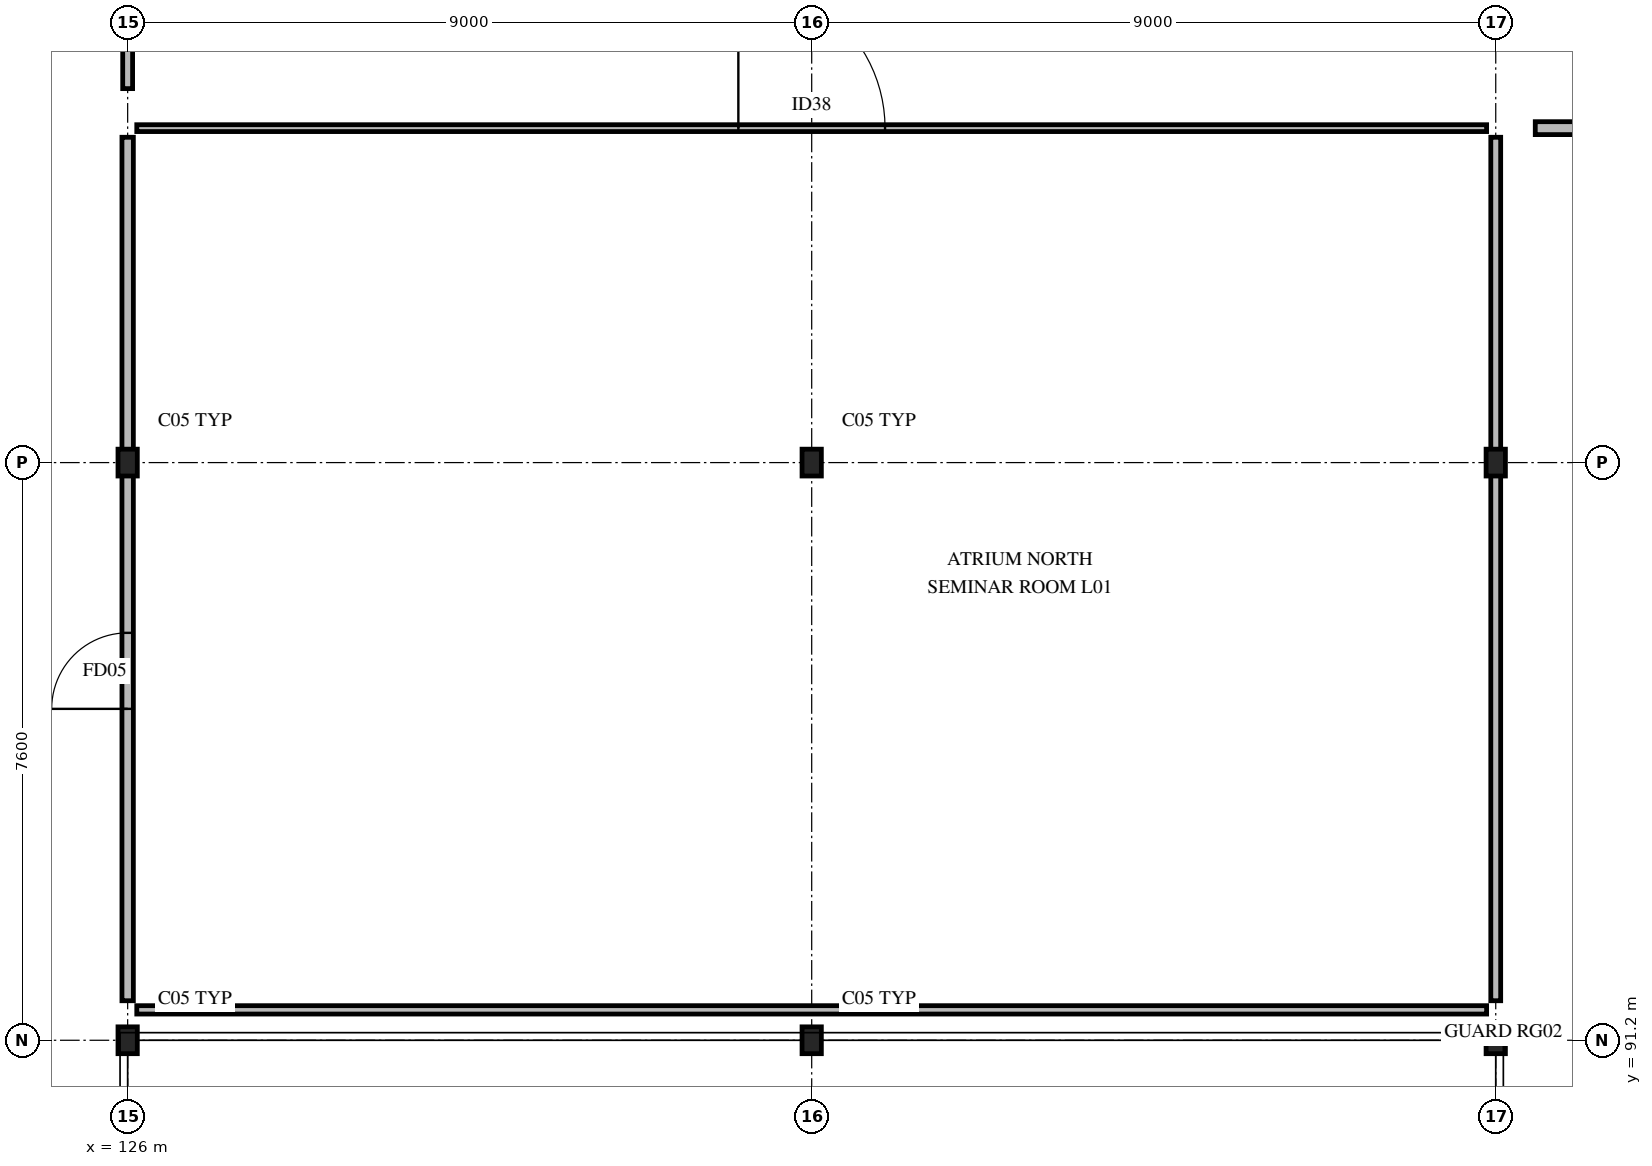
"""IFC4 building model, lengths in metres.
Left out: names, types, materials, properties, quantities, classifications, styles, units other than length and angle.
Written with IfcOpenShell. Run it as: python <this file> out.ifc"""

import sys

from ifc_helpers import new_model, si_unit, direction, frame, frame_2d, origin, origin_2d, place, context, subcontext, project, spatial, rectangle, i_section, extrude, element, fill, save


model = new_model("IFC4")
c1 = context("Model", 3, precision=1e-05, world=origin(), true_north=direction((0.0, 1.0)))
c2 = subcontext(c1, "Body", "Model", "MODEL_VIEW")
j1 = project(units=[si_unit("LENGTHUNIT", "METRE"), si_unit("PLANEANGLEUNIT", "RADIAN")], contexts=[c1])
p1 = place(None, origin())
s1 = spatial("IfcSite", under=j1, at=p1, CompositionType="ELEMENT")
p2 = place(p1, origin())
s2 = spatial("IfcBuilding", under=s1, at=p2, CompositionType="ELEMENT")
p3 = place(p2, frame((0.0, 0.0, 5.04)))
s3 = spatial("IfcBuildingStorey", under=s2, at=p3, CompositionType="ELEMENT", Elevation=5.04)
for number, where, z_axis, x_axis in (
    (1, (126.0, 91.2, 0.0), (0.0, 0.0, 1.0), (1.0, 0.0, 0.0)),
    (2, (126.0, 98.8, 0.0), (0.0, 0.0, 1.0), (1.0, 0.0, 0.0)),
    (3, (135.0, 91.2, 0.0), (0.0, 0.0, 1.0), (1.0, 0.0, 0.0)),
    (4, (135.0, 98.8, 0.0), (0.0, 0.0, 1.0), (1.0, 0.0, 0.0)),
    (5, (144.0, 91.2, 0.0), (0.0, 0.0, 1.0), (1.0, 0.0, 0.0)),
    (6, (144.0, 98.8, 0.0), (0.0, 0.0, 1.0), (1.0, 0.0, 0.0)),
):
    element("IfcColumn", number, at=place(p3, frame(where, z_axis=z_axis, x_axis=x_axis)), inside=s3, PredefinedType="COLUMN", context=c2, shape_type="SweptSolid", body=[
        extrude(i_section(OverallWidth=0.254, OverallDepth=0.353, WebThickness=0.01, FlangeThickness=0.016, FilletRadius=0.015, at=origin_2d()), origin(), (0.0, 0.0, 1.0), 4.32),
    ])
p4 = place(p3, frame((144.52, 103.2, 0.0), z_axis=(0.0, 0.0, 1.0), x_axis=(1.0, 0.0, 0.0)))
e7 = element("IfcWall", 7, at=p4, inside=s3, PredefinedType="PARTITIONING", context=c2, shape_type="SweptSolid", body=[
    extrude(rectangle(XDim=2.56, YDim=0.17, at=frame_2d((1.28, 0.0))), origin(), (0.0, 0.0, 1.0), 4.04),
])
p5 = place(p4, frame((0.78, 0.0, 0.0)))
e8 = element("IfcOpeningElement", 8, at=p5, cuts=e7, PredefinedType="OPENING", context=c2, shape_type="SweptSolid", body=[
    extrude(rectangle(XDim=1.0, YDim=2.15, at=frame_2d((0.5, 1.075))), frame((0.0, 0.095, 0.0), z_axis=(0.0, -1.0, 0.0), x_axis=(1.0, 0.0, 0.0)), (0.0, 0.0, 1.0), 0.19),
])
p6 = place(p3, frame((126.12, 103.2, 0.0), z_axis=(0.0, 0.0, 1.0), x_axis=(1.0, 0.0, 0.0)))
e9 = element("IfcWall", 9, at=p6, inside=s3, PredefinedType="PARTITIONING", context=c2, shape_type="SweptSolid", body=[
    extrude(rectangle(XDim=17.76, YDim=0.09, at=frame_2d((8.88, 0.0))), origin(), (0.0, 0.0, 1.0), 4.04),
])
p7 = place(p6, frame((7.915, 0.0, 0.0)))
e10 = element("IfcOpeningElement", 10, at=p7, cuts=e9, PredefinedType="OPENING", context=c2, shape_type="SweptSolid", body=[
    extrude(rectangle(XDim=1.93, YDim=2.15, at=frame_2d((0.965, 1.075))), frame((0.0, 0.055, 0.0), z_axis=(0.0, -1.0, 0.0), x_axis=(1.0, 0.0, 0.0)), (0.0, 0.0, 1.0), 0.11),
])
p8 = place(p3, frame((126.0, 91.72, 0.0), z_axis=(0.0, 0.0, 1.0), x_axis=(0.0, 1.0, 0.0)))
e11 = element("IfcWall", 11, at=p8, inside=s3, PredefinedType="PARTITIONING", context=c2, shape_type="SweptSolid", body=[
    extrude(rectangle(XDim=11.36, YDim=0.15, at=frame_2d((5.68, 0.0))), origin(), (0.0, 0.0, 1.0), 3.631),
])
p9 = place(p8, frame((3.84, 0.0, 0.0)))
e12 = element("IfcOpeningElement", 12, at=p9, cuts=e11, PredefinedType="OPENING", context=c2, shape_type="SweptSolid", body=[
    extrude(rectangle(XDim=1.0, YDim=2.15, at=frame_2d((0.5, 1.075))), frame((0.0, 0.085, 0.0), z_axis=(0.0, -1.0, 0.0), x_axis=(1.0, 0.0, 0.0)), (0.0, 0.0, 1.0), 0.17),
])
p10 = place(p3, frame((144.0, 91.72, 0.0), z_axis=(0.0, 0.0, 1.0), x_axis=(0.0, 1.0, 0.0)))
e13 = element("IfcWall", 13, at=p10, inside=s3, PredefinedType="PARTITIONING", context=c2, shape_type="SweptSolid", body=[
    extrude(rectangle(XDim=11.36, YDim=0.13, at=frame_2d((5.68, 0.0))), origin(), (0.0, 0.0, 1.0), 3.631),
])
p11 = place(p3, frame((126.12, 91.6, 0.0), z_axis=(0.0, 0.0, 1.0), x_axis=(1.0, 0.0, 0.0)))
e14 = element("IfcWall", 14, at=p11, inside=s3, PredefinedType="PARTITIONING", context=c2, shape_type="SweptSolid", body=[
    extrude(rectangle(XDim=17.76, YDim=0.11, at=frame_2d((8.88, 0.0))), origin(), (0.0, 0.0, 1.0), 4.04),
])
p12 = place(p3, frame((126.0, 103.72, 0.0), z_axis=(0.0, 0.0, 1.0), x_axis=(0.0, 1.0, 0.0)))
e15 = element("IfcWall", 15, at=p12, inside=s3, PredefinedType="PARTITIONING", context=c2, shape_type="SweptSolid", body=[
    extrude(rectangle(XDim=2.56, YDim=0.13, at=frame_2d((1.28, 0.0))), origin(), (0.0, 0.0, 1.0), 3.631),
])
p13 = place(p12, frame((0.83, 0.0, 0.0)))
e16 = element("IfcOpeningElement", 16, at=p13, cuts=e15, PredefinedType="OPENING", context=c2, shape_type="SweptSolid", body=[
    extrude(rectangle(XDim=0.9, YDim=2.06, at=frame_2d((0.45, 1.03))), frame((0.0, 0.075, 0.0), z_axis=(0.0, -1.0, 0.0), x_axis=(1.0, 0.0, 0.0)), (0.0, 0.0, 1.0), 0.15),
])
p14 = place(p7, origin())
e17 = element("IfcDoor", 17, at=p14, inside=s3, OperationType="SINGLE_SWING_LEFT", PredefinedType="DOOR", context=c2, shape_type="SweptSolid", body=[
    extrude(rectangle(XDim=1.93, YDim=2.15, at=frame_2d((0.965, 1.075))), frame((0.0, 0.025, 0.0), z_axis=(0.0, -1.0, 0.0), x_axis=(1.0, 0.0, 0.0)), (0.0, 0.0, 1.0), 0.05),
])
fill(e10, e17)
p15 = place(p9, origin())
e18 = element("IfcDoor", 18, at=p15, inside=s3, OperationType="SINGLE_SWING_LEFT", PredefinedType="DOOR", context=c2, shape_type="SweptSolid", body=[
    extrude(rectangle(XDim=1.0, YDim=2.15, at=frame_2d((0.5, 1.075))), frame((0.0, 0.025, 0.0), z_axis=(0.0, -1.0, 0.0), x_axis=(1.0, 0.0, 0.0)), (0.0, 0.0, 1.0), 0.05),
])
fill(e12, e18)
save(model, sys.argv[1])
